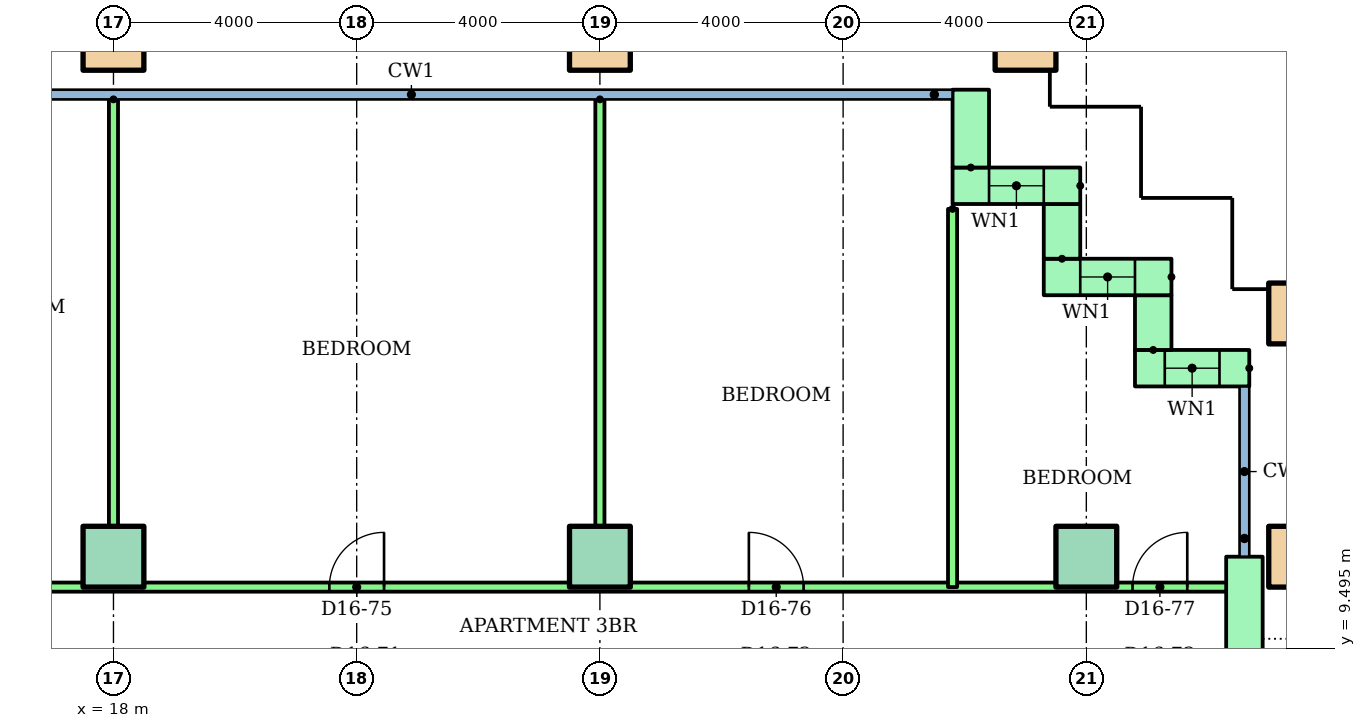
"""IFC4 building model, lengths in metres.
Left out: names, types, materials, properties, quantities, classifications, styles, units other than length and angle.
Written with IfcOpenShell. Run it as: python <this file> out.ifc"""

import sys

from ifc_helpers import new_model, si_unit, direction, frame, frame_2d, origin, origin_2d, place, context, subcontext, project, spatial, rectangle, hollow_rectangle, extrude, element, fill, save


model = new_model("IFC4")
c1 = context("Model", 3, precision=1e-05, world=origin(), true_north=direction((0.0, 1.0)))
c2 = subcontext(c1, "Body", "Model", "MODEL_VIEW")
j1 = project(units=[si_unit("LENGTHUNIT", "METRE"), si_unit("PLANEANGLEUNIT", "RADIAN")], contexts=[c1])
p1 = place(None, origin())
s1 = spatial("IfcSite", under=j1, at=p1, CompositionType="ELEMENT")
p2 = place(p1, origin())
s2 = spatial("IfcBuilding", under=s1, at=p2, CompositionType="ELEMENT")
p3 = place(p2, frame((0.0, 0.0, 60.8)))
s3 = spatial("IfcBuildingStorey", under=s2, at=p3, CompositionType="ELEMENT", Elevation=60.8)
for number, where in (
    (1, (18.0, 11.0, 0.0)),
    (2, (26.0, 11.0, 0.0)),
    (3, (34.0, 11.0, 0.0)),
):
    element("IfcColumn", number, at=place(p3, frame(where)), inside=s3, PredefinedType="COLUMN", context=c2, shape_type="SweptSolid", body=[
        extrude(rectangle(XDim=1.0, YDim=1.0, at=origin_2d()), origin(), (0.0, 0.0, 1.0), 3.2),
    ])
for number, where in (
    (4, (37.5, 11.0, 0.0)),
    (5, (37.5, 15.0, 0.0)),
    (6, (18.0, 19.5, 0.0)),
    (7, (26.0, 19.5, 0.0)),
    (8, (33.0, 19.5, 0.0)),
):
    element("IfcColumn", number, at=place(p3, frame(where)), inside=s3, PredefinedType="COLUMN", context=c2, shape_type="SweptSolid", body=[
        extrude(hollow_rectangle(XDim=1.0, YDim=1.0, WallThickness=0.05, at=origin_2d()), origin(), (0.0, 0.0, 1.0), 3.2),
    ])
p4 = place(p3, frame((36.68, 14.1, 0.0), z_axis=(0.0, 0.0, 1.0), x_axis=(-1.0, 0.0, 0.0)))
e9 = element("IfcWall", 9, at=p4, inside=s3, PredefinedType="STANDARD", context=c2, shape_type="SweptSolid", body=[
    extrude(rectangle(XDim=1.88, YDim=0.6, at=frame_2d((0.94, 0.0))), origin(), (0.0, 0.0, 1.0), 2.8),
])
p5 = place(p4, frame((0.49, 0.0, 0.9)))
e10 = element("IfcOpeningElement", 10, at=p5, cuts=e9, PredefinedType="OPENING", context=c2, shape_type="SweptSolid", body=[
    extrude(rectangle(XDim=0.9, YDim=1.5, at=frame_2d((0.45, 0.75))), frame((0.0, 0.31, 0.0), z_axis=(0.0, -1.0, 0.0), x_axis=(1.0, 0.0, 0.0)), (0.0, 0.0, 1.0), 0.62),
])
p6 = place(p3, frame((35.1, 14.4, 0.0), z_axis=(0.0, 0.0, 1.0), x_axis=(0.0, 1.0, 0.0)))
e11 = element("IfcWall", 11, at=p6, inside=s3, PredefinedType="STANDARD", context=c2, shape_type="SweptSolid", body=[
    extrude(rectangle(XDim=0.9, YDim=0.6, at=frame_2d((0.45, 0.0))), origin(), (0.0, 0.0, 1.0), 2.8),
])
p7 = place(p3, frame((35.4, 15.6, 0.0), z_axis=(0.0, 0.0, 1.0), x_axis=(-1.0, 0.0, 0.0)))
e12 = element("IfcWall", 12, at=p7, inside=s3, PredefinedType="STANDARD", context=c2, shape_type="SweptSolid", body=[
    extrude(rectangle(XDim=2.1, YDim=0.6, at=frame_2d((1.05, 0.0))), origin(), (0.0, 0.0, 1.0), 2.8),
])
p8 = place(p7, frame((0.6, 0.0, 0.9)))
e13 = element("IfcOpeningElement", 13, at=p8, cuts=e12, PredefinedType="OPENING", context=c2, shape_type="SweptSolid", body=[
    extrude(rectangle(XDim=0.9, YDim=1.5, at=frame_2d((0.45, 0.75))), frame((0.0, 0.31, 0.0), z_axis=(0.0, -1.0, 0.0), x_axis=(1.0, 0.0, 0.0)), (0.0, 0.0, 1.0), 0.62),
])
p9 = place(p3, frame((33.6, 15.9, 0.0), z_axis=(0.0, 0.0, 1.0), x_axis=(0.0, 1.0, 0.0)))
e14 = element("IfcWall", 14, at=p9, inside=s3, PredefinedType="STANDARD", context=c2, shape_type="SweptSolid", body=[
    extrude(rectangle(XDim=0.9, YDim=0.6, at=frame_2d((0.45, 0.0))), origin(), (0.0, 0.0, 1.0), 2.8),
])
p10 = place(p3, frame((33.9, 17.1, 0.0), z_axis=(0.0, 0.0, 1.0), x_axis=(-1.0, 0.0, 0.0)))
e15 = element("IfcWall", 15, at=p10, inside=s3, PredefinedType="STANDARD", context=c2, shape_type="SweptSolid", body=[
    extrude(rectangle(XDim=2.1, YDim=0.6, at=frame_2d((1.05, 0.0))), origin(), (0.0, 0.0, 1.0), 2.8),
])
p11 = place(p10, frame((0.6, 0.0, 0.9)))
e16 = element("IfcOpeningElement", 16, at=p11, cuts=e15, PredefinedType="OPENING", context=c2, shape_type="SweptSolid", body=[
    extrude(rectangle(XDim=0.9, YDim=1.5, at=frame_2d((0.45, 0.75))), frame((0.0, 0.31, 0.0), z_axis=(0.0, -1.0, 0.0), x_axis=(1.0, 0.0, 0.0)), (0.0, 0.0, 1.0), 0.62),
])
p12 = place(p3, frame((32.1, 17.4, 0.0), z_axis=(0.0, 0.0, 1.0), x_axis=(0.0, 1.0, 0.0)))
e17 = element("IfcWall", 17, at=p12, inside=s3, PredefinedType="STANDARD", context=c2, shape_type="SweptSolid", body=[
    extrude(rectangle(XDim=1.28, YDim=0.6, at=frame_2d((0.64, 0.0))), origin(), (0.0, 0.0, 1.0), 2.8),
])
p13 = place(p3, frame((36.6, 6.5, 0.0), z_axis=(0.0, 0.0, 1.0), x_axis=(0.0, 1.0, 0.0)))
e18 = element("IfcWall", 18, at=p13, inside=s3, PredefinedType="STANDARD", context=c2, shape_type="SweptSolid", body=[
    extrude(rectangle(XDim=4.5, YDim=0.6, at=frame_2d((2.25, 0.0))), origin(), (0.0, 0.0, 1.0), 2.8),
])
p14 = place(p13, frame((1.125, 0.0, 0.0)))
e19 = element("IfcOpeningElement", 19, at=p14, cuts=e18, PredefinedType="OPENING", context=c2, shape_type="SweptSolid", body=[
    extrude(rectangle(XDim=1.2, YDim=2.1, at=frame_2d((0.6, 1.05))), frame((0.0, 0.31, 0.0), z_axis=(0.0, -1.0, 0.0), x_axis=(1.0, 0.0, 0.0)), (0.0, 0.0, 1.0), 0.62),
])
p15 = place(p3, frame((14.0, 10.5, 0.0)))
e20 = element("IfcWall", 20, at=p15, inside=s3, PredefinedType="PARTITIONING", context=c2, shape_type="SweptSolid", body=[
    extrude(rectangle(XDim=22.51, YDim=0.15, at=frame_2d((11.255, 0.0))), origin(), (0.0, 0.0, 1.0), 2.4),
])
p16 = place(p15, frame((1.5, 0.0, 0.0)))
e21 = element("IfcOpeningElement", 21, at=p16, cuts=e20, PredefinedType="OPENING", context=c2, shape_type="SweptSolid", body=[
    extrude(rectangle(XDim=1.0, YDim=2.1, at=frame_2d((0.5, 1.05))), frame((0.0, 0.085, 0.0), z_axis=(0.0, -1.0, 0.0), x_axis=(1.0, 0.0, 0.0)), (0.0, 0.0, 1.0), 0.17),
])
p17 = place(p15, frame((7.55, 0.0, 0.0)))
e22 = element("IfcOpeningElement", 22, at=p17, cuts=e20, PredefinedType="OPENING", context=c2, shape_type="SweptSolid", body=[
    extrude(rectangle(XDim=0.9, YDim=2.1, at=frame_2d((0.45, 1.05))), frame((0.0, 0.085, 0.0), z_axis=(0.0, -1.0, 0.0), x_axis=(1.0, 0.0, 0.0)), (0.0, 0.0, 1.0), 0.17),
])
p18 = place(p15, frame((14.45, 0.0, 0.0)))
e23 = element("IfcOpeningElement", 23, at=p18, cuts=e20, PredefinedType="OPENING", context=c2, shape_type="SweptSolid", body=[
    extrude(rectangle(XDim=0.9, YDim=2.1, at=frame_2d((0.45, 1.05))), frame((0.0, 0.085, 0.0), z_axis=(0.0, -1.0, 0.0), x_axis=(1.0, 0.0, 0.0)), (0.0, 0.0, 1.0), 0.17),
])
p19 = place(p15, frame((20.76, 0.0, 0.0)))
e24 = element("IfcOpeningElement", 24, at=p19, cuts=e20, PredefinedType="OPENING", context=c2, shape_type="SweptSolid", body=[
    extrude(rectangle(XDim=0.9, YDim=2.1, at=frame_2d((0.45, 1.05))), frame((0.0, 0.085, 0.0), z_axis=(0.0, -1.0, 0.0), x_axis=(1.0, 0.0, 0.0)), (0.0, 0.0, 1.0), 0.17),
])
for number, where, z_axis, x_axis in (
    (25, (18.0, 18.521, 0.0), (0.0, 0.0, 1.0), (0.0, -1.0, 0.0)),
    (26, (26.0, 18.521, 0.0), (0.0, 0.0, 1.0), (0.0, -1.0, 0.0)),
):
    element("IfcWall", number, at=place(p3, frame(where, z_axis=z_axis, x_axis=x_axis)), inside=s3, PredefinedType="PARTITIONING", context=c2, shape_type="SweptSolid", body=[
        extrude(rectangle(XDim=8.021, YDim=0.15, at=frame_2d((4.01, 0.0))), origin(), (0.0, 0.0, 1.0), 2.4),
    ])
p20 = place(p3, frame((31.8, 16.72, 0.0), z_axis=(0.0, 0.0, 1.0), x_axis=(0.0, -1.0, 0.0)))
e27 = element("IfcWall", 27, at=p20, inside=s3, PredefinedType="PARTITIONING", context=c2, shape_type="SweptSolid", body=[
    extrude(rectangle(XDim=6.22, YDim=0.15, at=frame_2d((3.11, 0.0))), origin(), (0.0, 0.0, 1.0), 2.4),
])
p21 = place(p5, origin())
e28 = element("IfcWindow", 28, at=p21, inside=s3, PartitioningType="SINGLE_PANEL", PredefinedType="WINDOW", context=c2, shape_type="SweptSolid", body=[
    extrude(rectangle(XDim=0.9, YDim=1.5, at=frame_2d((0.45, 0.75))), frame((0.0, 0.03, 0.0), z_axis=(0.0, -1.0, 0.0), x_axis=(1.0, 0.0, 0.0)), (0.0, 0.0, 1.0), 0.06),
])
fill(e10, e28)
p22 = place(p8, origin())
e29 = element("IfcWindow", 29, at=p22, inside=s3, PartitioningType="SINGLE_PANEL", PredefinedType="WINDOW", context=c2, shape_type="SweptSolid", body=[
    extrude(rectangle(XDim=0.9, YDim=1.5, at=frame_2d((0.45, 0.75))), frame((0.0, 0.03, 0.0), z_axis=(0.0, -1.0, 0.0), x_axis=(1.0, 0.0, 0.0)), (0.0, 0.0, 1.0), 0.06),
])
fill(e13, e29)
p23 = place(p11, origin())
e30 = element("IfcWindow", 30, at=p23, inside=s3, PartitioningType="SINGLE_PANEL", PredefinedType="WINDOW", context=c2, shape_type="SweptSolid", body=[
    extrude(rectangle(XDim=0.9, YDim=1.5, at=frame_2d((0.45, 0.75))), frame((0.0, 0.03, 0.0), z_axis=(0.0, -1.0, 0.0), x_axis=(1.0, 0.0, 0.0)), (0.0, 0.0, 1.0), 0.06),
])
fill(e16, e30)
p24 = place(p17, origin())
e31 = element("IfcDoor", 31, at=p24, inside=s3, OperationType="SINGLE_SWING_RIGHT", PredefinedType="DOOR", context=c2, shape_type="SweptSolid", body=[
    extrude(rectangle(XDim=0.9, YDim=2.1, at=frame_2d((0.45, 1.05))), frame((0.0, 0.025, 0.0), z_axis=(0.0, -1.0, 0.0), x_axis=(1.0, 0.0, 0.0)), (0.0, 0.0, 1.0), 0.05),
])
fill(e22, e31)
p25 = place(p18, origin())
e32 = element("IfcDoor", 32, at=p25, inside=s3, OperationType="SINGLE_SWING_LEFT", PredefinedType="DOOR", context=c2, shape_type="SweptSolid", body=[
    extrude(rectangle(XDim=0.9, YDim=2.1, at=frame_2d((0.45, 1.05))), frame((0.0, 0.025, 0.0), z_axis=(0.0, -1.0, 0.0), x_axis=(1.0, 0.0, 0.0)), (0.0, 0.0, 1.0), 0.05),
])
fill(e23, e32)
p26 = place(p19, origin())
e33 = element("IfcDoor", 33, at=p26, inside=s3, OperationType="SINGLE_SWING_RIGHT", PredefinedType="DOOR", context=c2, shape_type="SweptSolid", body=[
    extrude(rectangle(XDim=0.9, YDim=2.1, at=frame_2d((0.45, 1.05))), frame((0.0, 0.025, 0.0), z_axis=(0.0, -1.0, 0.0), x_axis=(1.0, 0.0, 0.0)), (0.0, 0.0, 1.0), 0.05),
])
fill(e24, e33)
save(model, sys.argv[1])
